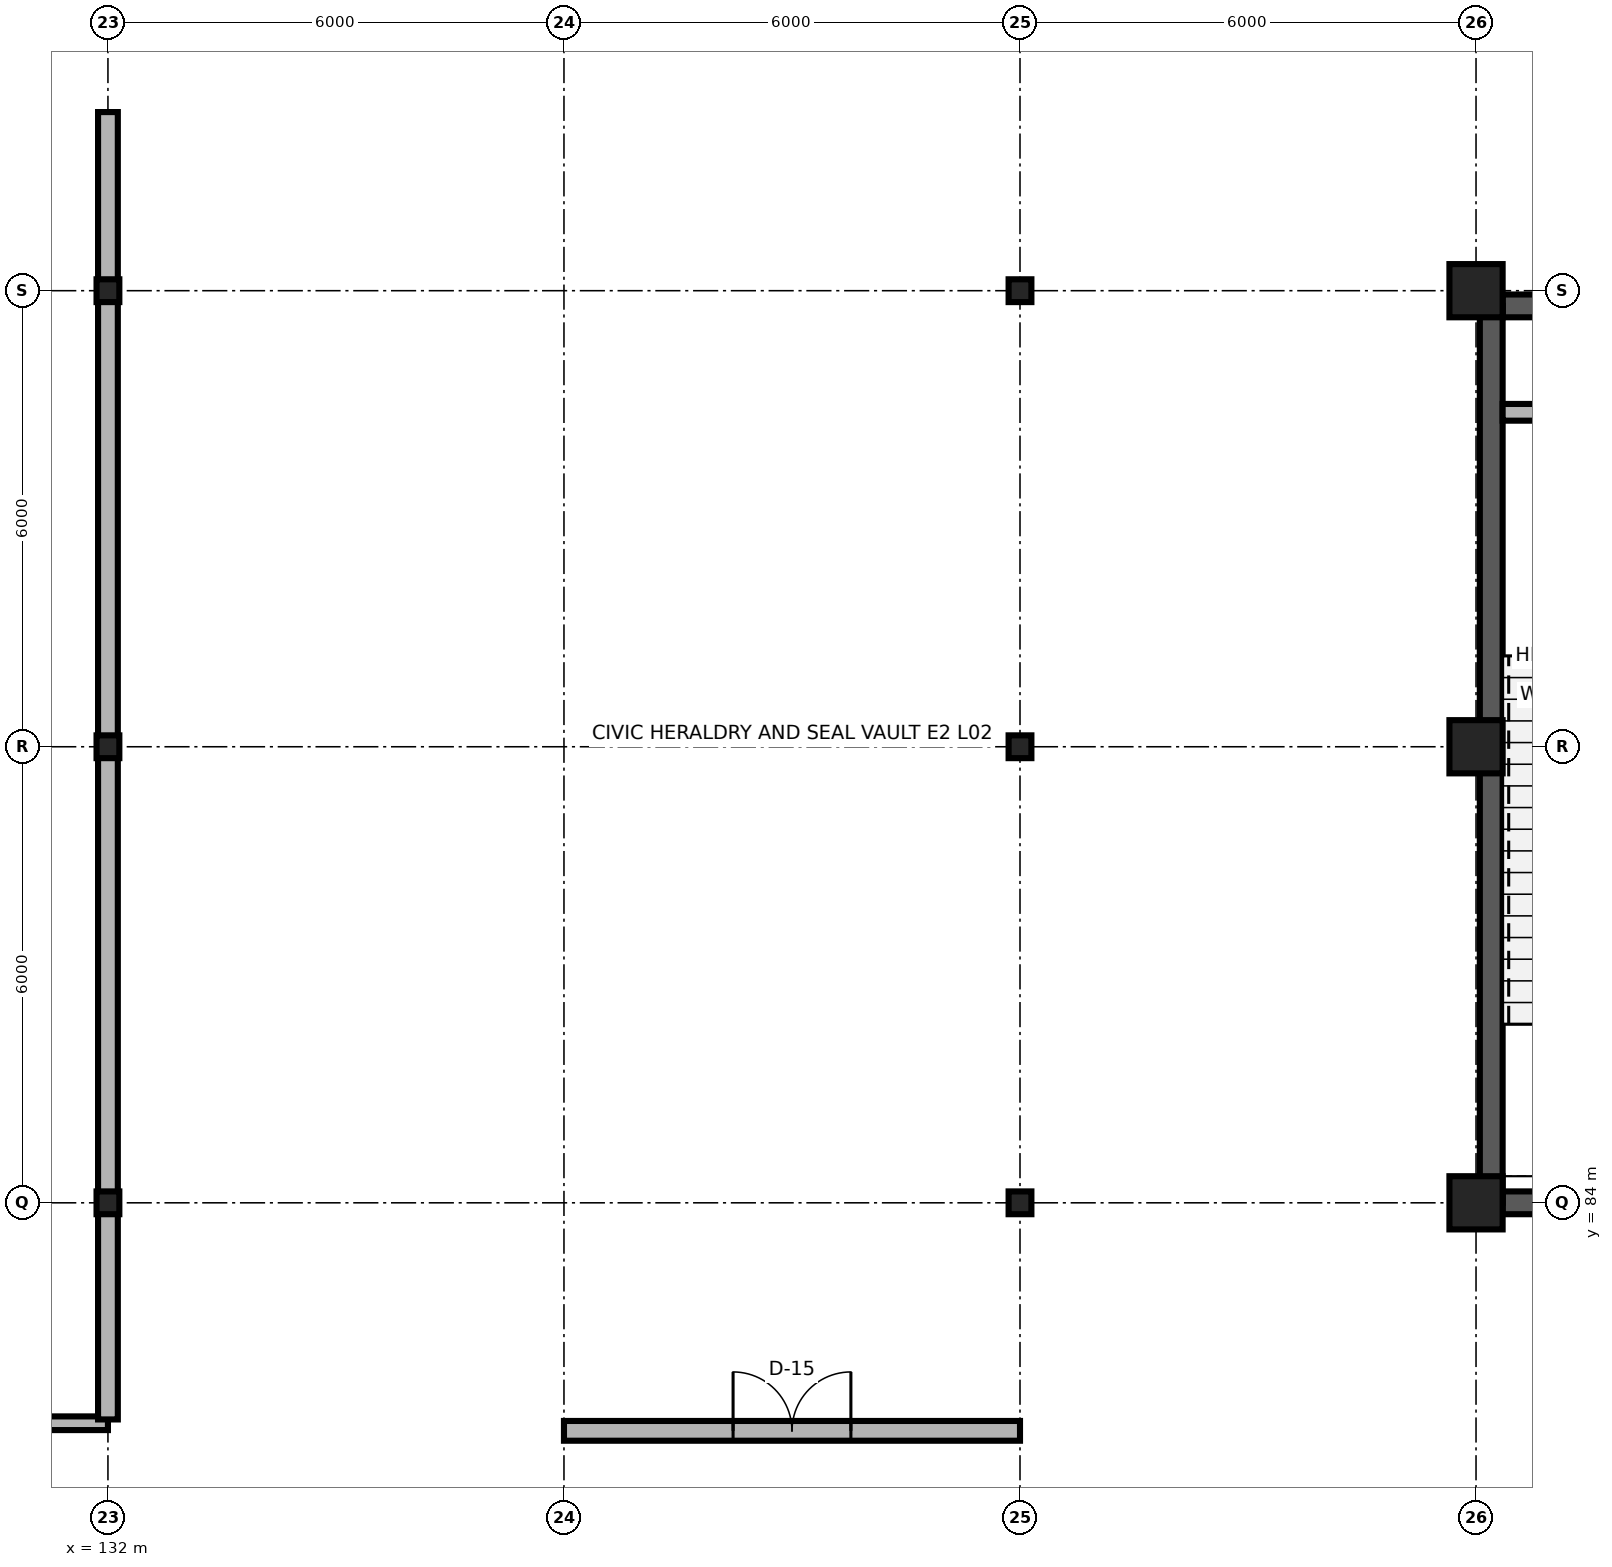
"""IFC4 building model, lengths in metres.
Left out: names, types, materials, properties, quantities, classifications, styles, units other than length and angle.
Written with IfcOpenShell. Run it as: python <this file> out.ifc"""

import sys

from ifc_helpers import new_model, si_unit, direction, frame, frame_2d, origin, origin_2d, place, context, subcontext, project, spatial, rectangle, i_section, extrude, element, fill, save


model = new_model("IFC4")
c1 = context("Model", 3, precision=1e-05, world=origin(), true_north=direction((0.0, 1.0)))
c2 = subcontext(c1, "Body", "Model", "MODEL_VIEW")
j1 = project(units=[si_unit("LENGTHUNIT", "METRE"), si_unit("PLANEANGLEUNIT", "RADIAN")], contexts=[c1])
p1 = place(None, origin())
s1 = spatial("IfcSite", under=j1, at=p1, CompositionType="ELEMENT")
p2 = place(p1, origin())
s2 = spatial("IfcBuilding", under=s1, at=p2, CompositionType="ELEMENT")
p3 = place(p2, frame((0.0, 0.0, 6.0)))
s3 = spatial("IfcBuildingStorey", under=s2, at=p3, CompositionType="ELEMENT", Elevation=6.0)
for number, where, z_axis, x_axis in (
    (1, (132.0, 84.0, 0.0), (0.0, 0.0, 1.0), (1.0, 0.0, 0.0)),
    (2, (144.0, 84.0, 0.0), (0.0, 0.0, 1.0), (1.0, 0.0, 0.0)),
):
    element("IfcColumn", number, at=place(p3, frame(where, z_axis=z_axis, x_axis=x_axis)), inside=s3, PredefinedType="COLUMN", context=c2, shape_type="SweptSolid", body=[
        extrude(i_section(OverallWidth=0.3, OverallDepth=0.3, WebThickness=0.01, FlangeThickness=0.015, FilletRadius=0.018, at=origin_2d()), origin(), (0.0, 0.0, 1.0), 6.0),
    ])
p4 = place(p3, frame((150.0, 84.0, 0.0), z_axis=(0.0, 0.0, 1.0), x_axis=(1.0, 0.0, 0.0)))
e3 = element("IfcColumn", 3, at=p4, inside=s3, PredefinedType="COLUMN", context=c2, shape_type="SweptSolid", body=[
    extrude(rectangle(XDim=0.7, YDim=0.7, at=origin_2d()), origin(), (0.0, 0.0, 1.0), 6.0),
])
for number, where, z_axis, x_axis in (
    (4, (132.0, 90.0, 0.0), (0.0, 0.0, 1.0), (1.0, 0.0, 0.0)),
    (5, (144.0, 90.0, 0.0), (0.0, 0.0, 1.0), (1.0, 0.0, 0.0)),
):
    element("IfcColumn", number, at=place(p3, frame(where, z_axis=z_axis, x_axis=x_axis)), inside=s3, PredefinedType="COLUMN", context=c2, shape_type="SweptSolid", body=[
        extrude(i_section(OverallWidth=0.3, OverallDepth=0.3, WebThickness=0.01, FlangeThickness=0.015, FilletRadius=0.018, at=origin_2d()), origin(), (0.0, 0.0, 1.0), 6.0),
    ])
p5 = place(p3, frame((150.0, 90.0, 0.0), z_axis=(0.0, 0.0, 1.0), x_axis=(1.0, 0.0, 0.0)))
e6 = element("IfcColumn", 6, at=p5, inside=s3, PredefinedType="COLUMN", context=c2, shape_type="SweptSolid", body=[
    extrude(rectangle(XDim=0.7, YDim=0.7, at=origin_2d()), origin(), (0.0, 0.0, 1.0), 6.0),
])
for number, where, z_axis, x_axis in (
    (7, (132.0, 96.0, 0.0), (0.0, 0.0, 1.0), (1.0, 0.0, 0.0)),
    (8, (144.0, 96.0, 0.0), (0.0, 0.0, 1.0), (1.0, 0.0, 0.0)),
):
    element("IfcColumn", number, at=place(p3, frame(where, z_axis=z_axis, x_axis=x_axis)), inside=s3, PredefinedType="COLUMN", context=c2, shape_type="SweptSolid", body=[
        extrude(i_section(OverallWidth=0.3, OverallDepth=0.3, WebThickness=0.01, FlangeThickness=0.015, FilletRadius=0.018, at=origin_2d()), origin(), (0.0, 0.0, 1.0), 6.0),
    ])
p6 = place(p3, frame((150.0, 96.0, 0.0), z_axis=(0.0, 0.0, 1.0), x_axis=(1.0, 0.0, 0.0)))
e9 = element("IfcColumn", 9, at=p6, inside=s3, PredefinedType="COLUMN", context=c2, shape_type="SweptSolid", body=[
    extrude(rectangle(XDim=0.7, YDim=0.7, at=origin_2d()), origin(), (0.0, 0.0, 1.0), 6.0),
])
p7 = place(p3, frame((150.35, 84.0, 0.0), z_axis=(0.0, 0.0, 1.0), x_axis=(1.0, 0.0, 0.0)))
e10 = element("IfcWall", 10, at=p7, inside=s3, PredefinedType="SHEAR", context=c2, shape_type="SweptSolid", body=[
    extrude(rectangle(XDim=5.3, YDim=0.3, at=frame_2d((2.65, 0.0))), origin(), (0.0, 0.0, 1.0), 5.76),
])
p8 = place(p7, frame((1.925, 0.0, 0.0)))
e11 = element("IfcOpeningElement", 11, at=p8, cuts=e10, PredefinedType="OPENING", context=c2, shape_type="SweptSolid", body=[
    extrude(rectangle(XDim=1.45, YDim=2.25, at=frame_2d((0.725, 1.125))), frame((0.0, 0.165, 0.0), z_axis=(0.0, -1.0, 0.0), x_axis=(1.0, 0.0, 0.0)), (0.0, 0.0, 1.0), 0.33),
])
p9 = place(p3, frame((150.35, 95.8, 0.0), z_axis=(0.0, 0.0, 1.0), x_axis=(1.0, 0.0, 0.0)))
e12 = element("IfcWall", 12, at=p9, inside=s3, PredefinedType="SHEAR", context=c2, shape_type="SweptSolid", body=[
    extrude(rectangle(XDim=5.3, YDim=0.3, at=frame_2d((2.65, 0.0))), origin(), (0.0, 0.0, 1.0), 5.76),
])
p10 = place(p3, frame((150.2, 84.0, 0.0), z_axis=(0.0, 0.0, 1.0), x_axis=(0.0, 1.0, 0.0)))
e13 = element("IfcWall", 13, at=p10, inside=s3, PredefinedType="SHEAR", context=c2, shape_type="SweptSolid", body=[
    extrude(rectangle(XDim=11.8, YDim=0.3, at=frame_2d((5.9, 0.0))), origin(), (0.0, 0.0, 1.0), 5.76),
])
p11 = place(p3, frame((150.35, 94.4, 0.0), z_axis=(0.0, 0.0, 1.0), x_axis=(1.0, 0.0, 0.0)))
e14 = element("IfcWall", 14, at=p11, inside=s3, PredefinedType="PARTITIONING", context=c2, shape_type="SweptSolid", body=[
    extrude(rectangle(XDim=1.1, YDim=0.22, at=frame_2d((0.55, 0.0))), origin(), (0.0, 0.0, 1.0), 5.76),
])
p12 = place(p3, frame((120.0, 81.1, 0.0), z_axis=(0.0, 0.0, 1.0), x_axis=(1.0, 0.0, 0.0)))
e15 = element("IfcWall", 15, at=p12, inside=s3, PredefinedType="PARTITIONING", context=c2, shape_type="SweptSolid", body=[
    extrude(rectangle(XDim=12.0, YDim=0.18, at=frame_2d((6.0, 0.0))), origin(), (0.0, 0.0, 1.0), 5.76),
])
p13 = place(p12, frame((4.95, 0.0, 0.0)))
e16 = element("IfcOpeningElement", 16, at=p13, cuts=e15, PredefinedType="OPENING", context=c2, shape_type="SweptSolid", body=[
    extrude(rectangle(XDim=2.1, YDim=2.9, at=frame_2d((1.05, 1.45))), frame((0.0, 0.105, 0.0), z_axis=(0.0, -1.0, 0.0), x_axis=(1.0, 0.0, 0.0)), (0.0, 0.0, 1.0), 0.21),
])
p14 = place(p3, frame((138.0, 81.0, 0.0), z_axis=(0.0, 0.0, 1.0), x_axis=(1.0, 0.0, 0.0)))
e17 = element("IfcWall", 17, at=p14, inside=s3, PredefinedType="PARTITIONING", context=c2, shape_type="SweptSolid", body=[
    extrude(rectangle(XDim=6.0, YDim=0.26, at=frame_2d((3.0, 0.0))), origin(), (0.0, 0.0, 1.0), 5.76),
])
p15 = place(p14, frame((2.225, 0.0, 0.0)))
e18 = element("IfcOpeningElement", 18, at=p15, cuts=e17, PredefinedType="OPENING", context=c2, shape_type="SweptSolid", body=[
    extrude(rectangle(XDim=1.55, YDim=2.3, at=frame_2d((0.775, 1.15))), frame((0.0, 0.145, 0.0), z_axis=(0.0, -1.0, 0.0), x_axis=(1.0, 0.0, 0.0)), (0.0, 0.0, 1.0), 0.29),
])
p16 = place(p3, frame((132.0, 81.15, 0.0), z_axis=(0.0, 0.0, 1.0), x_axis=(0.0, 1.0, 0.0)))
e19 = element("IfcWall", 19, at=p16, inside=s3, PredefinedType="PARTITIONING", context=c2, shape_type="SweptSolid", body=[
    extrude(rectangle(XDim=17.2, YDim=0.26, at=frame_2d((8.6, 0.0))), origin(), (0.0, 0.0, 1.0), 5.32),
])
p17 = place(p15, origin())
e20 = element("IfcDoor", 20, at=p17, inside=s3, OperationType="DOUBLE_DOOR_SINGLE_SWING", PredefinedType="DOOR", context=c2, shape_type="SweptSolid", body=[
    extrude(rectangle(XDim=1.55, YDim=2.3, at=frame_2d((0.775, 1.15))), frame((0.0, 0.025, 0.0), z_axis=(0.0, -1.0, 0.0), x_axis=(1.0, 0.0, 0.0)), (0.0, 0.0, 1.0), 0.05),
])
fill(e18, e20)
save(model, sys.argv[1])
